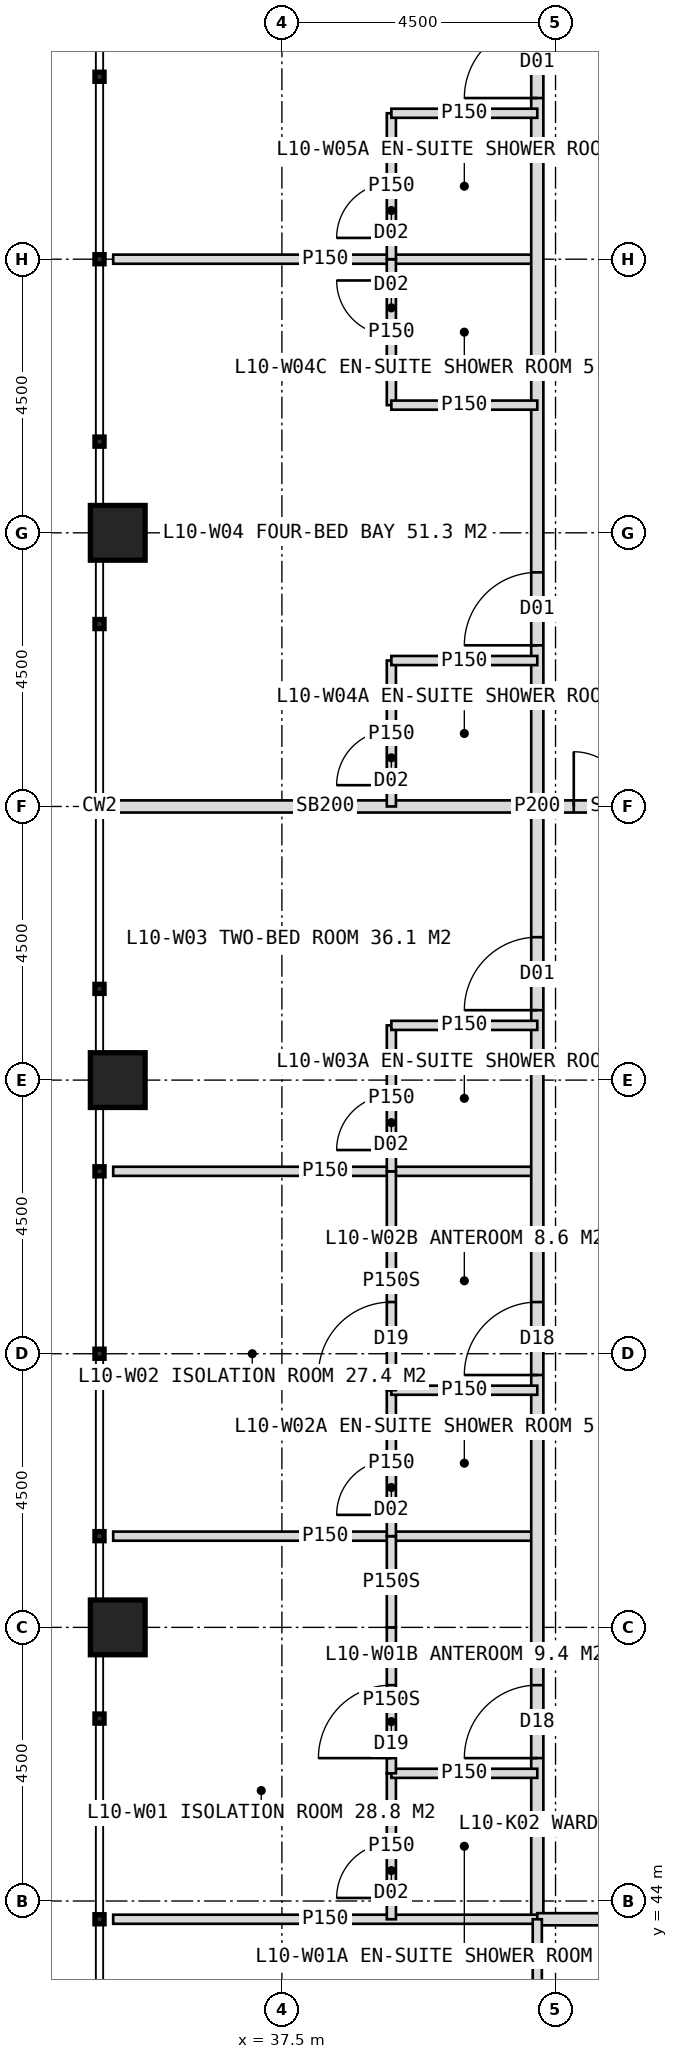
"""IFC4 building model, lengths in metres.
Left out: names, types, materials, properties, quantities, classifications, styles, units other than length and angle.
Written with IfcOpenShell. Run it as: python <this file> out.ifc"""

import sys

from ifc_helpers import new_model, si_unit, direction, frame, frame_2d, origin, origin_2d, place, context, subcontext, project, spatial, rectangle, hollow_rectangle, extrude, element, fill, save


model = new_model("IFC4")
c1 = context("Model", 3, precision=1e-05, world=origin(), true_north=direction((0.0, 1.0)))
c2 = subcontext(c1, "Body", "Model", "MODEL_VIEW")
j1 = project(units=[si_unit("LENGTHUNIT", "METRE"), si_unit("PLANEANGLEUNIT", "RADIAN")], contexts=[c1])
p1 = place(None, origin())
s1 = spatial("IfcSite", under=j1, at=p1, CompositionType="ELEMENT")
p2 = place(p1, origin())
s2 = spatial("IfcBuilding", under=s1, at=p2, CompositionType="ELEMENT")
p3 = place(p2, frame((0.0, 0.0, 47.0)))
s3 = spatial("IfcBuildingStorey", under=s2, at=p3, CompositionType="ELEMENT", Elevation=47.0)
for number, where, z_axis, x_axis in (
    (1, (34.8, 48.5, 0.0), (0.0, 0.0, 1.0), (1.0, 0.0, 0.0)),
    (2, (34.8, 57.5, 0.0), (0.0, 0.0, 1.0), (1.0, 0.0, 0.0)),
    (3, (34.8, 66.5, 0.0), (0.0, 0.0, 1.0), (1.0, 0.0, 0.0)),
):
    element("IfcColumn", number, at=place(p3, frame(where, z_axis=z_axis, x_axis=x_axis)), inside=s3, PredefinedType="COLUMN", context=c2, shape_type="SweptSolid", body=[
        extrude(hollow_rectangle(XDim=0.9, YDim=0.9, WallThickness=0.08, at=origin_2d()), origin(), (0.0, 0.0, 1.0), 4.0),
    ])
for number, where, z_axis, x_axis in (
    (4, (41.7, 50.0, 0.0), (0.0, 0.0, 1.0), (-1.0, 0.0, 0.0)),
    (5, (41.7, 56.0, 0.0), (0.0, 0.0, 1.0), (-1.0, 0.0, 0.0)),
):
    element("IfcWall", number, at=place(p3, frame(where, z_axis=z_axis, x_axis=x_axis)), inside=s3, PredefinedType="PARTITIONING", context=c2, shape_type="SweptSolid", body=[
        extrude(rectangle(XDim=6.975, YDim=0.15, at=frame_2d((3.487, 0.0))), origin(), (0.0, 0.0, 1.0), 3.75),
    ])
p4 = place(p3, frame((41.7, 62.0, 0.0), z_axis=(0.0, 0.0, 1.0), x_axis=(-1.0, 0.0, 0.0)))
e6 = element("IfcWall", 6, at=p4, inside=s3, PredefinedType="SOLIDWALL", context=c2, shape_type="SweptSolid", body=[
    extrude(rectangle(XDim=6.975, YDim=0.2, at=frame_2d((3.487, 0.0))), origin(), (0.0, 0.0, 1.0), 2.75),
])
p5 = place(p3, frame((41.7, 71.0, 0.0), z_axis=(0.0, 0.0, 1.0), x_axis=(-1.0, 0.0, 0.0)))
e7 = element("IfcWall", 7, at=p5, inside=s3, PredefinedType="PARTITIONING", context=c2, shape_type="SweptSolid", body=[
    extrude(rectangle(XDim=6.975, YDim=0.15, at=frame_2d((3.487, 0.0))), origin(), (0.0, 0.0, 1.0), 3.75),
])
p6 = place(p3, frame((41.7, 43.7, 0.0), z_axis=(0.0, 0.0, 1.0), x_axis=(0.0, 1.0, 0.0)))
e8 = element("IfcWall", 8, at=p6, inside=s3, PredefinedType="PARTITIONING", context=c2, shape_type="SweptSolid", body=[
    extrude(rectangle(XDim=36.6, YDim=0.2, at=frame_2d((18.3, 0.0))), origin(), (0.0, 0.0, 1.0), 3.75),
])
p7 = place(p6, frame((2.65, 0.0, 0.0)))
e9 = element("IfcOpeningElement", 9, at=p7, cuts=e8, PredefinedType="OPENING", context=c2, shape_type="SweptSolid", body=[
    extrude(rectangle(XDim=1.2, YDim=2.2, at=frame_2d((0.6, 1.1))), frame((0.0, 0.11, 0.0), z_axis=(0.0, -1.0, 0.0), x_axis=(1.0, 0.0, 0.0)), (0.0, 0.0, 1.0), 0.22),
])
p8 = place(p6, frame((8.95, 0.0, 0.0)))
e10 = element("IfcOpeningElement", 10, at=p8, cuts=e8, PredefinedType="OPENING", context=c2, shape_type="SweptSolid", body=[
    extrude(rectangle(XDim=1.2, YDim=2.2, at=frame_2d((0.6, 1.1))), frame((0.0, 0.11, 0.0), z_axis=(0.0, -1.0, 0.0), x_axis=(1.0, 0.0, 0.0)), (0.0, 0.0, 1.0), 0.22),
])
p9 = place(p6, frame((14.95, 0.0, 0.0)))
e11 = element("IfcOpeningElement", 11, at=p9, cuts=e8, PredefinedType="OPENING", context=c2, shape_type="SweptSolid", body=[
    extrude(rectangle(XDim=1.2, YDim=2.2, at=frame_2d((0.6, 1.1))), frame((0.0, 0.11, 0.0), z_axis=(0.0, -1.0, 0.0), x_axis=(1.0, 0.0, 0.0)), (0.0, 0.0, 1.0), 0.22),
])
p10 = place(p6, frame((20.95, 0.0, 0.0)))
e12 = element("IfcOpeningElement", 12, at=p10, cuts=e8, PredefinedType="OPENING", context=c2, shape_type="SweptSolid", body=[
    extrude(rectangle(XDim=1.2, YDim=2.2, at=frame_2d((0.6, 1.1))), frame((0.0, 0.11, 0.0), z_axis=(0.0, -1.0, 0.0), x_axis=(1.0, 0.0, 0.0)), (0.0, 0.0, 1.0), 0.22),
])
p11 = place(p6, frame((29.95, 0.0, 0.0)))
e13 = element("IfcOpeningElement", 13, at=p11, cuts=e8, PredefinedType="OPENING", context=c2, shape_type="SweptSolid", body=[
    extrude(rectangle(XDim=1.2, YDim=2.2, at=frame_2d((0.6, 1.1))), frame((0.0, 0.11, 0.0), z_axis=(0.0, -1.0, 0.0), x_axis=(1.0, 0.0, 0.0)), (0.0, 0.0, 1.0), 0.22),
])
p12 = place(p3, frame((41.7, 43.7, 0.0), z_axis=(0.0, 0.0, 1.0), x_axis=(-1.0, 0.0, 0.0)))
e14 = element("IfcWall", 14, at=p12, inside=s3, PredefinedType="PARTITIONING", context=c2, shape_type="SweptSolid", body=[
    extrude(rectangle(XDim=6.975, YDim=0.15, at=frame_2d((3.487, 0.0))), origin(), (0.0, 0.0, 1.0), 3.75),
])
p13 = place(p3, frame((39.3, 43.7, 0.0), z_axis=(0.0, 0.0, 1.0), x_axis=(0.0, 1.0, 0.0)))
e15 = element("IfcWall", 15, at=p13, inside=s3, PredefinedType="PARTITIONING", context=c2, shape_type="SweptSolid", body=[
    extrude(rectangle(XDim=2.4, YDim=0.15, at=frame_2d((1.2, 0.0))), origin(), (0.0, 0.0, 1.0), 2.95),
])
p14 = place(p13, frame((0.35, 0.0, 0.0)))
e16 = element("IfcOpeningElement", 16, at=p14, cuts=e15, PredefinedType="OPENING", context=c2, shape_type="SweptSolid", body=[
    extrude(rectangle(XDim=0.9, YDim=2.1, at=frame_2d((0.45, 1.05))), frame((0.0, 0.085, 0.0), z_axis=(0.0, -1.0, 0.0), x_axis=(1.0, 0.0, 0.0)), (0.0, 0.0, 1.0), 0.17),
])
p15 = place(p3, frame((41.7, 46.1, 0.0), z_axis=(0.0, 0.0, 1.0), x_axis=(-1.0, 0.0, 0.0)))
e17 = element("IfcWall", 17, at=p15, inside=s3, PredefinedType="PARTITIONING", context=c2, shape_type="SweptSolid", body=[
    extrude(rectangle(XDim=2.4, YDim=0.15, at=frame_2d((1.2, 0.0))), origin(), (0.0, 0.0, 1.0), 3.75),
])
p16 = place(p3, frame((39.3, 46.1, 0.0), z_axis=(0.0, 0.0, 1.0), x_axis=(0.0, 1.0, 0.0)))
e18 = element("IfcWall", 18, at=p16, inside=s3, PredefinedType="PARTITIONING", context=c2, shape_type="SweptSolid", body=[
    extrude(rectangle(XDim=2.4, YDim=0.15, at=frame_2d((1.2, 0.0))), origin(), (0.0, 0.0, 1.0), 2.95),
])
p17 = place(p16, frame((0.25, 0.0, 0.0)))
e19 = element("IfcOpeningElement", 19, at=p17, cuts=e18, PredefinedType="OPENING", context=c2, shape_type="SweptSolid", body=[
    extrude(rectangle(XDim=1.2, YDim=2.2, at=frame_2d((0.6, 1.1))), frame((0.0, 0.085, 0.0), z_axis=(0.0, -1.0, 0.0), x_axis=(1.0, 0.0, 0.0)), (0.0, 0.0, 1.0), 0.17),
])
p18 = place(p3, frame((39.3, 48.5, 0.0), z_axis=(0.0, 0.0, 1.0), x_axis=(0.0, 1.0, 0.0)))
e20 = element("IfcWall", 20, at=p18, inside=s3, PredefinedType="PARTITIONING", context=c2, shape_type="SweptSolid", body=[
    extrude(rectangle(XDim=1.5, YDim=0.15, at=frame_2d((0.75, 0.0))), origin(), (0.0, 0.0, 1.0), 3.75),
])
p19 = place(p3, frame((39.3, 50.0, 0.0), z_axis=(0.0, 0.0, 1.0), x_axis=(0.0, 1.0, 0.0)))
e21 = element("IfcWall", 21, at=p19, inside=s3, PredefinedType="PARTITIONING", context=c2, shape_type="SweptSolid", body=[
    extrude(rectangle(XDim=2.4, YDim=0.15, at=frame_2d((1.2, 0.0))), origin(), (0.0, 0.0, 1.0), 3.75),
])
p20 = place(p19, frame((0.35, 0.0, 0.0)))
e22 = element("IfcOpeningElement", 22, at=p20, cuts=e21, PredefinedType="OPENING", context=c2, shape_type="SweptSolid", body=[
    extrude(rectangle(XDim=0.9, YDim=2.1, at=frame_2d((0.45, 1.05))), frame((0.0, 0.085, 0.0), z_axis=(0.0, -1.0, 0.0), x_axis=(1.0, 0.0, 0.0)), (0.0, 0.0, 1.0), 0.17),
])
p21 = place(p3, frame((41.7, 52.4, 0.0), z_axis=(0.0, 0.0, 1.0), x_axis=(-1.0, 0.0, 0.0)))
e23 = element("IfcWall", 23, at=p21, inside=s3, PredefinedType="PARTITIONING", context=c2, shape_type="SweptSolid", body=[
    extrude(rectangle(XDim=2.4, YDim=0.15, at=frame_2d((1.2, 0.0))), origin(), (0.0, 0.0, 1.0), 3.75),
])
p22 = place(p3, frame((39.3, 52.4, 0.0), z_axis=(0.0, 0.0, 1.0), x_axis=(0.0, 1.0, 0.0)))
e24 = element("IfcWall", 24, at=p22, inside=s3, PredefinedType="PARTITIONING", context=c2, shape_type="SweptSolid", body=[
    extrude(rectangle(XDim=3.6, YDim=0.15, at=frame_2d((1.8, 0.0))), origin(), (0.0, 0.0, 1.0), 3.75),
])
p23 = place(p22, frame((0.25, 0.0, 0.0)))
e25 = element("IfcOpeningElement", 25, at=p23, cuts=e24, PredefinedType="OPENING", context=c2, shape_type="SweptSolid", body=[
    extrude(rectangle(XDim=1.2, YDim=2.2, at=frame_2d((0.6, 1.1))), frame((0.0, 0.085, 0.0), z_axis=(0.0, -1.0, 0.0), x_axis=(1.0, 0.0, 0.0)), (0.0, 0.0, 1.0), 0.17),
])
p24 = place(p3, frame((39.3, 56.0, 0.0), z_axis=(0.0, 0.0, 1.0), x_axis=(0.0, 1.0, 0.0)))
e26 = element("IfcWall", 26, at=p24, inside=s3, PredefinedType="PARTITIONING", context=c2, shape_type="SweptSolid", body=[
    extrude(rectangle(XDim=2.4, YDim=0.15, at=frame_2d((1.2, 0.0))), origin(), (0.0, 0.0, 1.0), 3.75),
])
p25 = place(p24, frame((0.35, 0.0, 0.0)))
e27 = element("IfcOpeningElement", 27, at=p25, cuts=e26, PredefinedType="OPENING", context=c2, shape_type="SweptSolid", body=[
    extrude(rectangle(XDim=0.9, YDim=2.1, at=frame_2d((0.45, 1.05))), frame((0.0, 0.085, 0.0), z_axis=(0.0, -1.0, 0.0), x_axis=(1.0, 0.0, 0.0)), (0.0, 0.0, 1.0), 0.17),
])
p26 = place(p3, frame((41.7, 58.4, 0.0), z_axis=(0.0, 0.0, 1.0), x_axis=(-1.0, 0.0, 0.0)))
e28 = element("IfcWall", 28, at=p26, inside=s3, PredefinedType="PARTITIONING", context=c2, shape_type="SweptSolid", body=[
    extrude(rectangle(XDim=2.4, YDim=0.15, at=frame_2d((1.2, 0.0))), origin(), (0.0, 0.0, 1.0), 3.75),
])
p27 = place(p3, frame((39.3, 62.0, 0.0), z_axis=(0.0, 0.0, 1.0), x_axis=(0.0, 1.0, 0.0)))
e29 = element("IfcWall", 29, at=p27, inside=s3, PredefinedType="PARTITIONING", context=c2, shape_type="SweptSolid", body=[
    extrude(rectangle(XDim=2.4, YDim=0.15, at=frame_2d((1.2, 0.0))), origin(), (0.0, 0.0, 1.0), 3.75),
])
p28 = place(p27, frame((0.35, 0.0, 0.0)))
e30 = element("IfcOpeningElement", 30, at=p28, cuts=e29, PredefinedType="OPENING", context=c2, shape_type="SweptSolid", body=[
    extrude(rectangle(XDim=0.9, YDim=2.1, at=frame_2d((0.45, 1.05))), frame((0.0, 0.085, 0.0), z_axis=(0.0, -1.0, 0.0), x_axis=(1.0, 0.0, 0.0)), (0.0, 0.0, 1.0), 0.17),
])
p29 = place(p3, frame((41.7, 64.4, 0.0), z_axis=(0.0, 0.0, 1.0), x_axis=(-1.0, 0.0, 0.0)))
e31 = element("IfcWall", 31, at=p29, inside=s3, PredefinedType="PARTITIONING", context=c2, shape_type="SweptSolid", body=[
    extrude(rectangle(XDim=2.4, YDim=0.15, at=frame_2d((1.2, 0.0))), origin(), (0.0, 0.0, 1.0), 3.75),
])
p30 = place(p3, frame((39.3, 68.6, 0.0), z_axis=(0.0, 0.0, 1.0), x_axis=(0.0, 1.0, 0.0)))
e32 = element("IfcWall", 32, at=p30, inside=s3, PredefinedType="PARTITIONING", context=c2, shape_type="SweptSolid", body=[
    extrude(rectangle(XDim=2.4, YDim=0.15, at=frame_2d((1.2, 0.0))), origin(), (0.0, 0.0, 1.0), 3.75),
])
p31 = place(p30, frame((1.15, 0.0, 0.0)))
e33 = element("IfcOpeningElement", 33, at=p31, cuts=e32, PredefinedType="OPENING", context=c2, shape_type="SweptSolid", body=[
    extrude(rectangle(XDim=0.9, YDim=2.1, at=frame_2d((0.45, 1.05))), frame((0.0, 0.085, 0.0), z_axis=(0.0, -1.0, 0.0), x_axis=(1.0, 0.0, 0.0)), (0.0, 0.0, 1.0), 0.17),
])
p32 = place(p3, frame((41.7, 68.6, 0.0), z_axis=(0.0, 0.0, 1.0), x_axis=(-1.0, 0.0, 0.0)))
e34 = element("IfcWall", 34, at=p32, inside=s3, PredefinedType="PARTITIONING", context=c2, shape_type="SweptSolid", body=[
    extrude(rectangle(XDim=2.4, YDim=0.15, at=frame_2d((1.2, 0.0))), origin(), (0.0, 0.0, 1.0), 3.75),
])
p33 = place(p3, frame((39.3, 71.0, 0.0), z_axis=(0.0, 0.0, 1.0), x_axis=(0.0, 1.0, 0.0)))
e35 = element("IfcWall", 35, at=p33, inside=s3, PredefinedType="PARTITIONING", context=c2, shape_type="SweptSolid", body=[
    extrude(rectangle(XDim=2.4, YDim=0.15, at=frame_2d((1.2, 0.0))), origin(), (0.0, 0.0, 1.0), 3.75),
])
p34 = place(p33, frame((0.35, 0.0, 0.0)))
e36 = element("IfcOpeningElement", 36, at=p34, cuts=e35, PredefinedType="OPENING", context=c2, shape_type="SweptSolid", body=[
    extrude(rectangle(XDim=0.9, YDim=2.1, at=frame_2d((0.45, 1.05))), frame((0.0, 0.085, 0.0), z_axis=(0.0, -1.0, 0.0), x_axis=(1.0, 0.0, 0.0)), (0.0, 0.0, 1.0), 0.17),
])
p35 = place(p3, frame((41.7, 73.4, 0.0), z_axis=(0.0, 0.0, 1.0), x_axis=(-1.0, 0.0, 0.0)))
e37 = element("IfcWall", 37, at=p35, inside=s3, PredefinedType="PARTITIONING", context=c2, shape_type="SweptSolid", body=[
    extrude(rectangle(XDim=2.4, YDim=0.15, at=frame_2d((1.2, 0.0))), origin(), (0.0, 0.0, 1.0), 3.75),
])
p36 = place(p3, frame((78.3, 43.7, 0.0), z_axis=(0.0, 0.0, 1.0), x_axis=(-1.0, 0.0, 0.0)))
e38 = element("IfcWall", 38, at=p36, inside=s3, PredefinedType="PARTITIONING", context=c2, shape_type="SweptSolid", body=[
    extrude(rectangle(XDim=36.6, YDim=0.2, at=frame_2d((18.3, 0.0))), origin(), (0.0, 0.0, 1.0), 3.75),
])
p37 = place(p36, frame((2.65, 0.0, 0.0)))
e39 = element("IfcOpeningElement", 39, at=p37, cuts=e38, PredefinedType="OPENING", context=c2, shape_type="SweptSolid", body=[
    extrude(rectangle(XDim=1.2, YDim=2.2, at=frame_2d((0.6, 1.1))), frame((0.0, 0.11, 0.0), z_axis=(0.0, -1.0, 0.0), x_axis=(1.0, 0.0, 0.0)), (0.0, 0.0, 1.0), 0.22),
])
p38 = place(p36, frame((11.95, 0.0, 0.0)))
e40 = element("IfcOpeningElement", 40, at=p38, cuts=e38, PredefinedType="OPENING", context=c2, shape_type="SweptSolid", body=[
    extrude(rectangle(XDim=1.2, YDim=2.2, at=frame_2d((0.6, 1.1))), frame((0.0, 0.11, 0.0), z_axis=(0.0, -1.0, 0.0), x_axis=(1.0, 0.0, 0.0)), (0.0, 0.0, 1.0), 0.22),
])
p39 = place(p36, frame((20.95, 0.0, 0.0)))
e41 = element("IfcOpeningElement", 41, at=p39, cuts=e38, PredefinedType="OPENING", context=c2, shape_type="SweptSolid", body=[
    extrude(rectangle(XDim=1.2, YDim=2.2, at=frame_2d((0.6, 1.1))), frame((0.0, 0.11, 0.0), z_axis=(0.0, -1.0, 0.0), x_axis=(1.0, 0.0, 0.0)), (0.0, 0.0, 1.0), 0.22),
])
p40 = place(p36, frame((29.95, 0.0, 0.0)))
e42 = element("IfcOpeningElement", 42, at=p40, cuts=e38, PredefinedType="OPENING", context=c2, shape_type="SweptSolid", body=[
    extrude(rectangle(XDim=1.2, YDim=2.2, at=frame_2d((0.6, 1.1))), frame((0.0, 0.11, 0.0), z_axis=(0.0, -1.0, 0.0), x_axis=(1.0, 0.0, 0.0)), (0.0, 0.0, 1.0), 0.22),
])
p41 = place(p3, frame((41.7, 43.7, 0.0), z_axis=(0.0, 0.0, 1.0), x_axis=(0.0, -1.0, 0.0)))
e43 = element("IfcWall", 43, at=p41, inside=s3, PredefinedType="PARTITIONING", context=c2, shape_type="SweptSolid", body=[
    extrude(rectangle(XDim=2.4, YDim=0.15, at=frame_2d((1.2, 0.0))), origin(), (0.0, 0.0, 1.0), 3.75),
])
p42 = place(p3, frame((44.4, 62.0, 0.0), z_axis=(0.0, 0.0, 1.0), x_axis=(-1.0, 0.0, 0.0)))
e44 = element("IfcWall", 44, at=p42, inside=s3, PredefinedType="SOLIDWALL", context=c2, shape_type="SweptSolid", body=[
    extrude(rectangle(XDim=2.7, YDim=0.2, at=frame_2d((1.35, 0.0))), origin(), (0.0, 0.0, 1.0), 2.75),
])
p43 = place(p42, frame((0.3, 0.0, 0.0)))
e45 = element("IfcOpeningElement", 45, at=p43, cuts=e44, PredefinedType="OPENING", context=c2, shape_type="SweptSolid", body=[
    extrude(rectangle(XDim=1.8, YDim=2.2, at=frame_2d((0.9, 1.1))), frame((0.0, 0.11, 0.0), z_axis=(0.0, -1.0, 0.0), x_axis=(1.0, 0.0, 0.0)), (0.0, 0.0, 1.0), 0.22),
])
p44 = place(p17, origin())
e46 = element("IfcDoor", 46, at=p44, inside=s3, OperationType="SINGLE_SWING_LEFT", PredefinedType="DOOR", context=c2, shape_type="SweptSolid", body=[
    extrude(rectangle(XDim=1.2, YDim=2.2, at=frame_2d((0.6, 1.1))), frame((0.0, 0.025, 0.0), z_axis=(0.0, -1.0, 0.0), x_axis=(1.0, 0.0, 0.0)), (0.0, 0.0, 1.0), 0.05),
])
fill(e19, e46)
p45 = place(p7, origin())
e47 = element("IfcDoor", 47, at=p45, inside=s3, OperationType="SINGLE_SWING_LEFT", PredefinedType="DOOR", context=c2, shape_type="SweptSolid", body=[
    extrude(rectangle(XDim=1.2, YDim=2.2, at=frame_2d((0.6, 1.1))), frame((0.0, 0.025, 0.0), z_axis=(0.0, -1.0, 0.0), x_axis=(1.0, 0.0, 0.0)), (0.0, 0.0, 1.0), 0.05),
])
fill(e9, e47)
p46 = place(p14, origin())
e48 = element("IfcDoor", 48, at=p46, inside=s3, OperationType="SINGLE_SWING_LEFT", PredefinedType="DOOR", context=c2, shape_type="SweptSolid", body=[
    extrude(rectangle(XDim=0.9, YDim=2.1, at=frame_2d((0.45, 1.05))), frame((0.0, 0.025, 0.0), z_axis=(0.0, -1.0, 0.0), x_axis=(1.0, 0.0, 0.0)), (0.0, 0.0, 1.0), 0.05),
])
fill(e16, e48)
p47 = place(p23, origin())
e49 = element("IfcDoor", 49, at=p47, inside=s3, OperationType="SINGLE_SWING_LEFT", PredefinedType="DOOR", context=c2, shape_type="SweptSolid", body=[
    extrude(rectangle(XDim=1.2, YDim=2.2, at=frame_2d((0.6, 1.1))), frame((0.0, 0.025, 0.0), z_axis=(0.0, -1.0, 0.0), x_axis=(1.0, 0.0, 0.0)), (0.0, 0.0, 1.0), 0.05),
])
fill(e25, e49)
p48 = place(p8, origin())
e50 = element("IfcDoor", 50, at=p48, inside=s3, OperationType="SINGLE_SWING_LEFT", PredefinedType="DOOR", context=c2, shape_type="SweptSolid", body=[
    extrude(rectangle(XDim=1.2, YDim=2.2, at=frame_2d((0.6, 1.1))), frame((0.0, 0.025, 0.0), z_axis=(0.0, -1.0, 0.0), x_axis=(1.0, 0.0, 0.0)), (0.0, 0.0, 1.0), 0.05),
])
fill(e10, e50)
p49 = place(p20, origin())
e51 = element("IfcDoor", 51, at=p49, inside=s3, OperationType="SINGLE_SWING_LEFT", PredefinedType="DOOR", context=c2, shape_type="SweptSolid", body=[
    extrude(rectangle(XDim=0.9, YDim=2.1, at=frame_2d((0.45, 1.05))), frame((0.0, 0.025, 0.0), z_axis=(0.0, -1.0, 0.0), x_axis=(1.0, 0.0, 0.0)), (0.0, 0.0, 1.0), 0.05),
])
fill(e22, e51)
p50 = place(p9, origin())
e52 = element("IfcDoor", 52, at=p50, inside=s3, OperationType="SINGLE_SWING_LEFT", PredefinedType="DOOR", context=c2, shape_type="SweptSolid", body=[
    extrude(rectangle(XDim=1.2, YDim=2.2, at=frame_2d((0.6, 1.1))), frame((0.0, 0.025, 0.0), z_axis=(0.0, -1.0, 0.0), x_axis=(1.0, 0.0, 0.0)), (0.0, 0.0, 1.0), 0.05),
])
fill(e11, e52)
p51 = place(p25, origin())
e53 = element("IfcDoor", 53, at=p51, inside=s3, OperationType="SINGLE_SWING_LEFT", PredefinedType="DOOR", context=c2, shape_type="SweptSolid", body=[
    extrude(rectangle(XDim=0.9, YDim=2.1, at=frame_2d((0.45, 1.05))), frame((0.0, 0.025, 0.0), z_axis=(0.0, -1.0, 0.0), x_axis=(1.0, 0.0, 0.0)), (0.0, 0.0, 1.0), 0.05),
])
fill(e27, e53)
p52 = place(p10, origin())
e54 = element("IfcDoor", 54, at=p52, inside=s3, OperationType="SINGLE_SWING_LEFT", PredefinedType="DOOR", context=c2, shape_type="SweptSolid", body=[
    extrude(rectangle(XDim=1.2, YDim=2.2, at=frame_2d((0.6, 1.1))), frame((0.0, 0.025, 0.0), z_axis=(0.0, -1.0, 0.0), x_axis=(1.0, 0.0, 0.0)), (0.0, 0.0, 1.0), 0.05),
])
fill(e12, e54)
p53 = place(p28, origin())
e55 = element("IfcDoor", 55, at=p53, inside=s3, OperationType="SINGLE_SWING_LEFT", PredefinedType="DOOR", context=c2, shape_type="SweptSolid", body=[
    extrude(rectangle(XDim=0.9, YDim=2.1, at=frame_2d((0.45, 1.05))), frame((0.0, 0.025, 0.0), z_axis=(0.0, -1.0, 0.0), x_axis=(1.0, 0.0, 0.0)), (0.0, 0.0, 1.0), 0.05),
])
fill(e30, e55)
p54 = place(p31, origin())
e56 = element("IfcDoor", 56, at=p54, inside=s3, OperationType="SINGLE_SWING_RIGHT", PredefinedType="DOOR", context=c2, shape_type="SweptSolid", body=[
    extrude(rectangle(XDim=0.9, YDim=2.1, at=frame_2d((0.45, 1.05))), frame((0.0, 0.025, 0.0), z_axis=(0.0, -1.0, 0.0), x_axis=(1.0, 0.0, 0.0)), (0.0, 0.0, 1.0), 0.05),
])
fill(e33, e56)
p55 = place(p11, origin())
e57 = element("IfcDoor", 57, at=p55, inside=s3, OperationType="SINGLE_SWING_LEFT", PredefinedType="DOOR", context=c2, shape_type="SweptSolid", body=[
    extrude(rectangle(XDim=1.2, YDim=2.2, at=frame_2d((0.6, 1.1))), frame((0.0, 0.025, 0.0), z_axis=(0.0, -1.0, 0.0), x_axis=(1.0, 0.0, 0.0)), (0.0, 0.0, 1.0), 0.05),
])
fill(e13, e57)
p56 = place(p34, origin())
e58 = element("IfcDoor", 58, at=p56, inside=s3, OperationType="SINGLE_SWING_LEFT", PredefinedType="DOOR", context=c2, shape_type="SweptSolid", body=[
    extrude(rectangle(XDim=0.9, YDim=2.1, at=frame_2d((0.45, 1.05))), frame((0.0, 0.025, 0.0), z_axis=(0.0, -1.0, 0.0), x_axis=(1.0, 0.0, 0.0)), (0.0, 0.0, 1.0), 0.05),
])
fill(e36, e58)
p57 = place(p43, origin())
e59 = element("IfcDoor", 59, at=p57, inside=s3, OperationType="DOUBLE_DOOR_DOUBLE_SWING", PredefinedType="DOOR", context=c2, shape_type="SweptSolid", body=[
    extrude(rectangle(XDim=1.8, YDim=2.2, at=frame_2d((0.9, 1.1))), frame((0.0, 0.025, 0.0), z_axis=(0.0, -1.0, 0.0), x_axis=(1.0, 0.0, 0.0)), (0.0, 0.0, 1.0), 0.05),
])
fill(e45, e59)
save(model, sys.argv[1])
